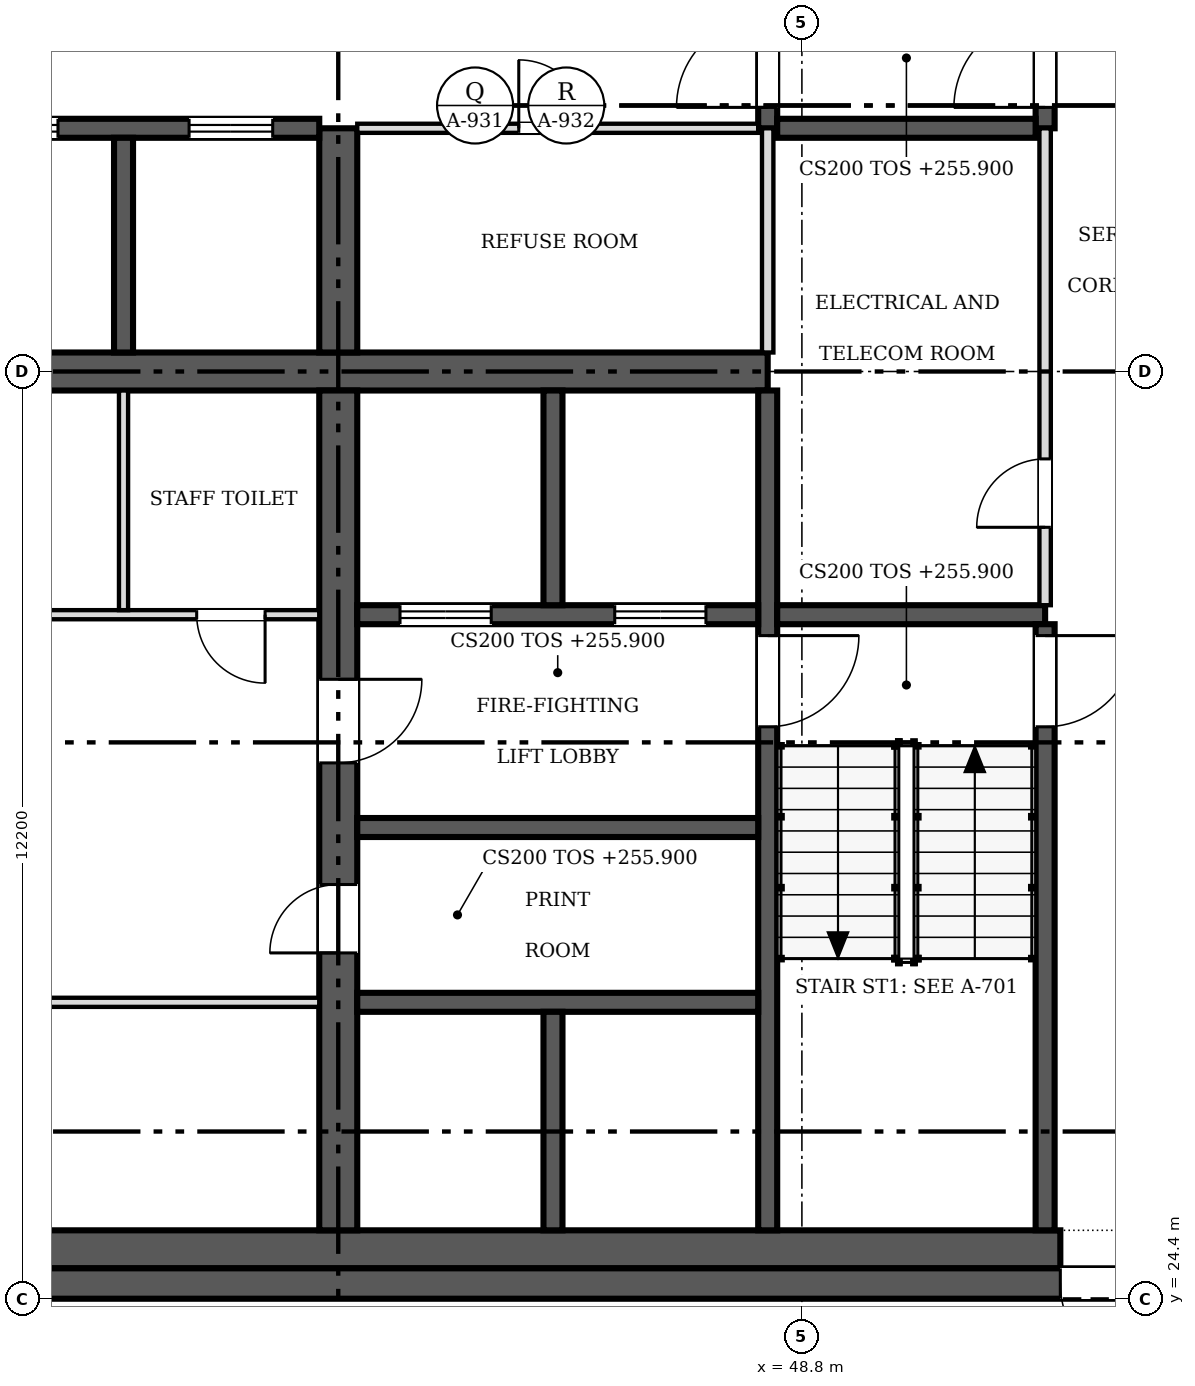
"""IFC4 building model, lengths in metres.
Left out: names, types, materials, properties, quantities, classifications, styles, units other than length and angle.
Written with IfcOpenShell. Run it as: python <this file> out.ifc"""

import sys

from ifc_helpers import new_model, si_unit, direction, frame, frame_2d, origin, place, context, subcontext, project, spatial, rectangle, extrude, source, transform, mapped, element, fill, save


model = new_model("IFC4")
c1 = context("Model", 3, precision=1e-05, world=origin(), true_north=direction((0.0, 1.0)))
c2 = subcontext(c1, "Body", "Model", "MODEL_VIEW")
j1 = project(units=[si_unit("LENGTHUNIT", "METRE"), si_unit("PLANEANGLEUNIT", "RADIAN")], contexts=[c1])
p1 = place(None, origin())
s1 = spatial("IfcSite", under=j1, at=p1, CompositionType="ELEMENT")
p2 = place(p1, origin())
s2 = spatial("IfcBuilding", under=s1, at=p2, CompositionType="ELEMENT")
p3 = place(p2, frame((0.0, 0.0, 255.9)))
s3 = spatial("IfcBuildingStorey", under=s2, at=p3, CompositionType="ELEMENT", Elevation=255.9)
p4 = place(p3, frame((54.9, 24.6, 0.0), z_axis=(0.0, 0.0, 1.0), x_axis=(-1.0, 0.0, 0.0)))
e1 = element("IfcWall", 1, at=p4, inside=s3, PredefinedType="SHEAR", context=c2, shape_type="SweptSolid", body=[
    extrude(rectangle(XDim=24.4, YDim=0.4, at=frame_2d((12.2, 0.0))), origin(), (0.0, 0.0, 1.0), 3.8),
])
m1 = source(origin(), c2, "Body", "SweptSolid", [
    extrude(rectangle(XDim=1.2, YDim=2.1, at=frame_2d((0.6, 1.05))), frame((0.0, 0.21, 0.0), z_axis=(0.0, -1.0, 0.0), x_axis=(1.0, 0.0, 0.0)), (0.0, 0.0, 1.0), 0.42),
])
p5 = place(p4, frame((1.5, 0.0, 0.0)))
e2 = element("IfcOpeningElement", 2, at=p5, cuts=e1, PredefinedType="OPENING", context=c2, shape_type="MappedRepresentation", body=[
    mapped(m1, transform((0.0, 0.0, 0.0), scale=1.0)),
])
p6 = place(p3, frame((30.9, 25.05, 0.0), z_axis=(0.0, 0.0, 1.0), x_axis=(1.0, 0.0, 0.0)))
e3 = element("IfcWall", 3, at=p6, inside=s3, PredefinedType="SOLIDWALL", context=c2, shape_type="SweptSolid", body=[
    extrude(rectangle(XDim=21.3, YDim=0.5, at=frame_2d((10.65, 0.0))), origin(), (0.0, 0.0, 1.0), 3.8),
])
p7 = place(p3, frame((31.4, 36.6, 0.0), z_axis=(0.0, 0.0, 1.0), x_axis=(1.0, 0.0, 0.0)))
e4 = element("IfcWall", 4, at=p7, inside=s3, PredefinedType="SHEAR", context=c2, shape_type="SweptSolid", body=[
    extrude(rectangle(XDim=16.95, YDim=0.5, at=frame_2d((8.475, 0.0))), origin(), (0.0, 0.0, 1.0), 3.8),
])
p8 = place(p3, frame((42.7, 36.35, 0.0), z_axis=(0.0, 0.0, 1.0), x_axis=(0.0, -1.0, 0.0)))
e5 = element("IfcWall", 5, at=p8, inside=s3, PredefinedType="SHEAR", context=c2, shape_type="SweptSolid", body=[
    extrude(rectangle(XDim=11.05, YDim=0.5, at=frame_2d((5.525, 0.0))), origin(), (0.0, 0.0, 1.0), 3.8),
])
m2 = source(origin(), c2, "Body", "SweptSolid", [
    extrude(rectangle(XDim=0.9, YDim=2.1, at=frame_2d((0.45, 1.05))), frame((0.0, 0.26, 0.0), z_axis=(0.0, -1.0, 0.0), x_axis=(1.0, 0.0, 0.0)), (0.0, 0.0, 1.0), 0.52),
])
p9 = place(p8, frame((6.5, 0.0, 0.0)))
e6 = element("IfcOpeningElement", 6, at=p9, cuts=e5, PredefinedType="OPENING", context=c2, shape_type="MappedRepresentation", body=[
    mapped(m2, transform((0.0, 0.0, 0.0), scale=1.0)),
])
m3 = source(origin(), c2, "Body", "SweptSolid", [
    extrude(rectangle(XDim=1.1, YDim=2.1, at=frame_2d((0.55, 1.05))), frame((0.0, 0.26, 0.0), z_axis=(0.0, -1.0, 0.0), x_axis=(1.0, 0.0, 0.0)), (0.0, 0.0, 1.0), 0.52),
])
p10 = place(p8, frame((3.8, 0.0, 0.0)))
e7 = element("IfcOpeningElement", 7, at=p10, cuts=e5, PredefinedType="OPENING", context=c2, shape_type="MappedRepresentation", body=[
    mapped(m3, transform((0.0, 0.0, 0.0), scale=1.0)),
])
p11 = place(p3, frame((42.7, 36.85, 0.0), z_axis=(0.0, 0.0, 1.0), x_axis=(0.0, 1.0, 0.0)))
e8 = element("IfcWall", 8, at=p11, inside=s3, PredefinedType="SHEAR", context=c2, shape_type="SweptSolid", body=[
    extrude(rectangle(XDim=2.95, YDim=0.5, at=frame_2d((1.475, 0.0))), origin(), (0.0, 0.0, 1.0), 3.8),
])
p12 = place(p3, frame((31.4, 39.8, 0.0), z_axis=(0.0, 0.0, 1.0), x_axis=(1.0, 0.0, 0.0)))
e9 = element("IfcWall", 9, at=p12, inside=s3, PredefinedType="SOLIDWALL", context=c2, shape_type="SweptSolid", body=[
    extrude(rectangle(XDim=11.05, YDim=0.25, at=frame_2d((5.525, 0.0))), origin(), (0.0, 0.0, 1.0), 3.8),
])
m4 = source(origin(), c2, "Body", "SweptSolid", [
    extrude(rectangle(XDim=1.1, YDim=2.1, at=frame_2d((0.55, 1.05))), frame((0.0, 0.135, 0.0), z_axis=(0.0, -1.0, 0.0), x_axis=(1.0, 0.0, 0.0)), (0.0, 0.0, 1.0), 0.27),
])
p13 = place(p12, frame((0.863, 0.0, 0.0)))
e10 = element("IfcOpeningElement", 10, at=p13, cuts=e9, PredefinedType="OPENING", context=c2, shape_type="MappedRepresentation", body=[
    mapped(m4, transform((0.0, 0.0, 0.0), scale=1.0)),
])
p14 = place(p12, frame((3.688, 0.0, 0.0)))
e11 = element("IfcOpeningElement", 11, at=p14, cuts=e9, PredefinedType="OPENING", context=c2, shape_type="MappedRepresentation", body=[
    mapped(m4, transform((0.0, 0.0, 0.0), scale=1.0)),
])
p15 = place(p12, frame((6.512, 0.0, 0.0)))
e12 = element("IfcOpeningElement", 12, at=p15, cuts=e9, PredefinedType="OPENING", context=c2, shape_type="MappedRepresentation", body=[
    mapped(m4, transform((0.0, 0.0, 0.0), scale=1.0)),
])
p16 = place(p12, frame((9.337, 0.0, 0.0)))
e13 = element("IfcOpeningElement", 13, at=p16, cuts=e9, PredefinedType="OPENING", context=c2, shape_type="MappedRepresentation", body=[
    mapped(m4, transform((0.0, 0.0, 0.0), scale=1.0)),
])
p17 = place(p3, frame((48.35, 36.35, 0.0), z_axis=(0.0, 0.0, 1.0), x_axis=(0.0, -1.0, 0.0)))
e14 = element("IfcWall", 14, at=p17, inside=s3, PredefinedType="SOLIDWALL", context=c2, shape_type="SweptSolid", body=[
    extrude(rectangle(XDim=11.05, YDim=0.25, at=frame_2d((5.525, 0.0))), origin(), (0.0, 0.0, 1.0), 3.8),
])
m5 = source(origin(), c2, "Body", "SweptSolid", [
    extrude(rectangle(XDim=1.2, YDim=2.1, at=frame_2d((0.6, 1.05))), frame((0.0, 0.135, 0.0), z_axis=(0.0, -1.0, 0.0), x_axis=(1.0, 0.0, 0.0)), (0.0, 0.0, 1.0), 0.27),
])
p18 = place(p17, frame((3.225, 0.0, 0.0)))
e15 = element("IfcOpeningElement", 15, at=p18, cuts=e14, PredefinedType="OPENING", context=c2, shape_type="MappedRepresentation", body=[
    mapped(m5, transform((0.0, 0.0, 0.0), scale=1.0)),
])
p19 = place(p3, frame((48.225, 33.4, 0.0), z_axis=(0.0, 0.0, 1.0), x_axis=(-1.0, 0.0, 0.0)))
e16 = element("IfcWall", 16, at=p19, inside=s3, PredefinedType="SOLIDWALL", context=c2, shape_type="SweptSolid", body=[
    extrude(rectangle(XDim=5.275, YDim=0.25, at=frame_2d((2.638, 0.0))), origin(), (0.0, 0.0, 1.0), 3.8),
])
p20 = place(p19, frame((3.512, 0.0, 0.0)))
e17 = element("IfcOpeningElement", 17, at=p20, cuts=e16, PredefinedType="OPENING", context=c2, shape_type="MappedRepresentation", body=[
    mapped(m5, transform((0.0, 0.0, 0.0), scale=1.0)),
])
p21 = place(p19, frame((0.688, 0.0, 0.0)))
e18 = element("IfcOpeningElement", 18, at=p21, cuts=e16, PredefinedType="OPENING", context=c2, shape_type="MappedRepresentation", body=[
    mapped(m5, transform((0.0, 0.0, 0.0), scale=1.0)),
])
p22 = place(p3, frame((48.475, 33.4, 0.0), z_axis=(0.0, 0.0, 1.0), x_axis=(1.0, 0.0, 0.0)))
e19 = element("IfcWall", 19, at=p22, inside=s3, PredefinedType="SOLIDWALL", context=c2, shape_type="SweptSolid", body=[
    extrude(rectangle(XDim=3.525, YDim=0.25, at=frame_2d((1.762, 0.0))), origin(), (0.0, 0.0, 1.0), 3.8),
])
p23 = place(p3, frame((48.35, 47.9, 0.0), z_axis=(0.0, 0.0, 1.0), x_axis=(0.0, -1.0, 0.0)))
e20 = element("IfcWall", 20, at=p23, inside=s3, PredefinedType="SOLIDWALL", context=c2, shape_type="SweptSolid", body=[
    extrude(rectangle(XDim=8.1, YDim=0.25, at=frame_2d((4.05, 0.0))), origin(), (0.0, 0.0, 1.0), 3.8),
])
p24 = place(p23, frame((6.625, 0.0, 0.0)))
e21 = element("IfcOpeningElement", 21, at=p24, cuts=e20, PredefinedType="OPENING", context=c2, shape_type="MappedRepresentation", body=[
    mapped(m5, transform((0.0, 0.0, 0.0), scale=1.0)),
])
p25 = place(p3, frame((52.0, 25.3, 0.0), z_axis=(0.0, 0.0, 1.0), x_axis=(0.0, 1.0, 0.0)))
e22 = element("IfcWall", 22, at=p25, inside=s3, PredefinedType="SOLIDWALL", context=c2, shape_type="SweptSolid", body=[
    extrude(rectangle(XDim=7.975, YDim=0.25, at=frame_2d((3.987, 0.0))), origin(), (0.0, 0.0, 1.0), 3.8),
])
p26 = place(p25, frame((6.625, 0.0, 0.0)))
e23 = element("IfcOpeningElement", 23, at=p26, cuts=e22, PredefinedType="OPENING", context=c2, shape_type="MappedRepresentation", body=[
    mapped(m5, transform((0.0, 0.0, 0.0), scale=1.0)),
])
p27 = place(p3, frame((52.0, 39.8, 0.0), z_axis=(0.0, 0.0, 1.0), x_axis=(0.0, 1.0, 0.0)))
e24 = element("IfcWall", 24, at=p27, inside=s3, PredefinedType="SOLIDWALL", context=c2, shape_type="SweptSolid", body=[
    extrude(rectangle(XDim=8.1, YDim=0.25, at=frame_2d((4.05, 0.0))), origin(), (0.0, 0.0, 1.0), 3.8),
])
p28 = place(p27, frame((0.275, 0.0, 0.0)))
e25 = element("IfcOpeningElement", 25, at=p28, cuts=e24, PredefinedType="OPENING", context=c2, shape_type="MappedRepresentation", body=[
    mapped(m5, transform((0.0, 0.0, 0.0), scale=1.0)),
])
for number, where, z_axis, x_axis in (
    (26, (42.95, 28.3, 0.0), (0.0, 0.0, 1.0), (1.0, 0.0, 0.0)),
    (27, (42.95, 30.6, 0.0), (0.0, 0.0, 1.0), (1.0, 0.0, 0.0)),
):
    element("IfcWall", number, at=place(p3, frame(where, z_axis=z_axis, x_axis=x_axis)), inside=s3, PredefinedType="SOLIDWALL", context=c2, shape_type="SweptSolid", body=[
        extrude(rectangle(XDim=5.275, YDim=0.25, at=frame_2d((2.638, 0.0))), origin(), (0.0, 0.0, 1.0), 3.8),
    ])
p29 = place(p3, frame((48.475, 39.8, 0.0), z_axis=(0.0, 0.0, 1.0), x_axis=(1.0, 0.0, 0.0)))
e28 = element("IfcWall", 28, at=p29, inside=s3, PredefinedType="SOLIDWALL", context=c2, shape_type="SweptSolid", body=[
    extrude(rectangle(XDim=3.4, YDim=0.25, at=frame_2d((1.7, 0.0))), origin(), (0.0, 0.0, 1.0), 3.8),
])
p30 = place(p3, frame((39.875, 36.85, 0.0), z_axis=(0.0, 0.0, 1.0), x_axis=(0.0, 1.0, 0.0)))
e29 = element("IfcWall", 29, at=p30, inside=s3, PredefinedType="SOLIDWALL", context=c2, shape_type="SweptSolid", body=[
    extrude(rectangle(XDim=2.825, YDim=0.25, at=frame_2d((1.413, 0.0))), origin(), (0.0, 0.0, 1.0), 3.8),
])
p31 = place(p3, frame((45.525, 33.525, 0.0), z_axis=(0.0, 0.0, 1.0), x_axis=(0.0, 1.0, 0.0)))
e30 = element("IfcWall", 30, at=p31, inside=s3, PredefinedType="SOLIDWALL", context=c2, shape_type="SweptSolid", body=[
    extrude(rectangle(XDim=2.825, YDim=0.25, at=frame_2d((1.413, 0.0))), origin(), (0.0, 0.0, 1.0), 3.8),
])
p32 = place(p3, frame((45.525, 25.3, 0.0), z_axis=(0.0, 0.0, 1.0), x_axis=(0.0, 1.0, 0.0)))
e31 = element("IfcWall", 31, at=p32, inside=s3, PredefinedType="SOLIDWALL", context=c2, shape_type="SweptSolid", body=[
    extrude(rectangle(XDim=2.875, YDim=0.25, at=frame_2d((1.438, 0.0))), origin(), (0.0, 0.0, 1.0), 3.8),
])
p33 = place(p3, frame((42.45, 28.3, 0.0), z_axis=(0.0, 0.0, 1.0), x_axis=(-1.0, 0.0, 0.0)))
e32 = element("IfcWall", 32, at=p33, inside=s3, PredefinedType="PARTITIONING", context=c2, shape_type="SweptSolid", body=[
    extrude(rectangle(XDim=11.05, YDim=0.12, at=frame_2d((5.525, 0.0))), origin(), (0.0, 0.0, 1.0), 3.55),
])
m6 = source(origin(), c2, "Body", "SweptSolid", [
    extrude(rectangle(XDim=0.9, YDim=2.1, at=frame_2d((0.45, 1.05))), frame((0.0, 0.07, 0.0), z_axis=(0.0, -1.0, 0.0), x_axis=(1.0, 0.0, 0.0)), (0.0, 0.0, 1.0), 0.14),
])
p34 = place(p33, frame((9.188, 0.0, 0.0)))
e33 = element("IfcOpeningElement", 33, at=p34, cuts=e32, PredefinedType="OPENING", context=c2, shape_type="MappedRepresentation", body=[
    mapped(m6, transform((0.0, 0.0, 0.0), scale=1.0)),
])
p35 = place(p33, frame((3.538, 0.0, 0.0)))
e34 = element("IfcOpeningElement", 34, at=p35, cuts=e32, PredefinedType="OPENING", context=c2, shape_type="MappedRepresentation", body=[
    mapped(m6, transform((0.0, 0.0, 0.0), scale=1.0)),
])
p36 = place(p3, frame((31.4, 33.4, 0.0), z_axis=(0.0, 0.0, 1.0), x_axis=(1.0, 0.0, 0.0)))
e35 = element("IfcWall", 35, at=p36, inside=s3, PredefinedType="PARTITIONING", context=c2, shape_type="SweptSolid", body=[
    extrude(rectangle(XDim=11.05, YDim=0.12, at=frame_2d((5.525, 0.0))), origin(), (0.0, 0.0, 1.0), 3.55),
])
p37 = place(p36, frame((3.788, 0.0, 0.0)))
e36 = element("IfcOpeningElement", 36, at=p37, cuts=e35, PredefinedType="OPENING", context=c2, shape_type="MappedRepresentation", body=[
    mapped(m6, transform((0.0, 0.0, 0.0), scale=1.0)),
])
p38 = place(p36, frame((9.438, 0.0, 0.0)))
e37 = element("IfcOpeningElement", 37, at=p38, cuts=e35, PredefinedType="OPENING", context=c2, shape_type="MappedRepresentation", body=[
    mapped(m6, transform((0.0, 0.0, 0.0), scale=1.0)),
])
p39 = place(p3, frame((52.0, 33.525, 0.0), z_axis=(0.0, 0.0, 1.0), x_axis=(0.0, 1.0, 0.0)))
e38 = element("IfcWall", 38, at=p39, inside=s3, PredefinedType="PARTITIONING", context=c2, shape_type="SweptSolid", body=[
    extrude(rectangle(XDim=6.275, YDim=0.15, at=frame_2d((3.138, 0.0))), origin(), (0.0, 0.0, 1.0), 3.55),
])
m7 = source(origin(), c2, "Body", "SweptSolid", [
    extrude(rectangle(XDim=0.9, YDim=2.1, at=frame_2d((0.45, 1.05))), frame((0.0, 0.085, 0.0), z_axis=(0.0, -1.0, 0.0), x_axis=(1.0, 0.0, 0.0)), (0.0, 0.0, 1.0), 0.17),
])
p40 = place(p39, frame((1.025, 0.0, 0.0)))
e39 = element("IfcOpeningElement", 39, at=p40, cuts=e38, PredefinedType="OPENING", context=c2, shape_type="MappedRepresentation", body=[
    mapped(m7, transform((0.0, 0.0, 0.0), scale=1.0)),
])
p41 = place(p3, frame((48.225, 39.8, 0.0), z_axis=(0.0, 0.0, 1.0), x_axis=(-1.0, 0.0, 0.0)))
e40 = element("IfcWall", 40, at=p41, inside=s3, PredefinedType="PARTITIONING", context=c2, shape_type="SweptSolid", body=[
    extrude(rectangle(XDim=5.275, YDim=0.12, at=frame_2d((2.638, 0.0))), origin(), (0.0, 0.0, 1.0), 3.55),
])
p42 = place(p41, frame((2.25, 0.0, 0.0)))
e41 = element("IfcOpeningElement", 41, at=p42, cuts=e40, PredefinedType="OPENING", context=c2, shape_type="MappedRepresentation", body=[
    mapped(m6, transform((0.0, 0.0, 0.0), scale=1.0)),
])
p43 = place(p3, frame((48.35, 36.85, 0.0), z_axis=(0.0, 0.0, 1.0), x_axis=(0.0, 1.0, 0.0)))
e42 = element("IfcWall", 42, at=p43, inside=s3, PredefinedType="PARTITIONING", context=c2, shape_type="SweptSolid", body=[
    extrude(rectangle(XDim=2.95, YDim=0.15, at=frame_2d((1.475, 0.0))), origin(), (0.0, 0.0, 1.0), 3.55),
])
p44 = place(p3, frame((39.875, 33.46, 0.0), z_axis=(0.0, 0.0, 1.0), x_axis=(0.0, 1.0, 0.0)))
e43 = element("IfcWall", 43, at=p44, inside=s3, PredefinedType="PARTITIONING", context=c2, shape_type="SweptSolid", body=[
    extrude(rectangle(XDim=2.89, YDim=0.12, at=frame_2d((1.445, 0.0))), origin(), (0.0, 0.0, 1.0), 3.55),
])
m8 = source(origin(), c2, "Body", "SweptSolid", [
    extrude(rectangle(XDim=1.2, YDim=2.1, at=frame_2d((0.6, 1.05))), frame((0.0, 0.025, 0.0), z_axis=(0.0, -1.0, 0.0), x_axis=(1.0, 0.0, 0.0)), (0.0, 0.0, 1.0), 0.05),
])
p45 = place(p5, origin())
e44 = element("IfcDoor", 44, at=p45, inside=s3, OperationType="SINGLE_SWING_LEFT", PredefinedType="DOOR", context=c2, shape_type="MappedRepresentation", body=[
    mapped(m8, transform((0.0, 0.0, 0.0), scale=1.0)),
])
fill(e2, e44)
m9 = source(origin(), c2, "Body", "SweptSolid", [
    extrude(rectangle(XDim=0.9, YDim=2.1, at=frame_2d((0.45, 1.05))), frame((0.0, 0.025, 0.0), z_axis=(0.0, -1.0, 0.0), x_axis=(1.0, 0.0, 0.0)), (0.0, 0.0, 1.0), 0.05),
])
p46 = place(p9, origin())
e45 = element("IfcDoor", 45, at=p46, inside=s3, OperationType="SINGLE_SWING_RIGHT", PredefinedType="DOOR", context=c2, shape_type="MappedRepresentation", body=[
    mapped(m9, transform((0.0, 0.0, 0.0), scale=1.0)),
])
fill(e6, e45)
m10 = source(origin(), c2, "Body", "SweptSolid", [
    extrude(rectangle(XDim=1.1, YDim=2.1, at=frame_2d((0.55, 1.05))), frame((0.0, 0.025, 0.0), z_axis=(0.0, -1.0, 0.0), x_axis=(1.0, 0.0, 0.0)), (0.0, 0.0, 1.0), 0.05),
])
p47 = place(p10, origin())
e46 = element("IfcDoor", 46, at=p47, inside=s3, OperationType="SINGLE_SWING_LEFT", PredefinedType="DOOR", context=c2, shape_type="MappedRepresentation", body=[
    mapped(m10, transform((0.0, 0.0, 0.0), scale=1.0)),
])
fill(e7, e46)
p48 = place(p15, origin())
e47 = element("IfcDoor", 47, at=p48, inside=s3, OperationType="DOUBLE_DOOR_SLIDING", PredefinedType="DOOR", context=c2, shape_type="MappedRepresentation", body=[
    mapped(m10, transform((0.0, 0.0, 0.0), scale=1.0)),
])
fill(e12, e47)
p49 = place(p16, origin())
e48 = element("IfcDoor", 48, at=p49, inside=s3, OperationType="DOUBLE_DOOR_SLIDING", PredefinedType="DOOR", context=c2, shape_type="MappedRepresentation", body=[
    mapped(m10, transform((0.0, 0.0, 0.0), scale=1.0)),
])
fill(e13, e48)
p50 = place(p18, origin())
e49 = element("IfcDoor", 49, at=p50, inside=s3, OperationType="SINGLE_SWING_LEFT", PredefinedType="DOOR", context=c2, shape_type="MappedRepresentation", body=[
    mapped(m8, transform((0.0, 0.0, 0.0), scale=1.0)),
])
fill(e15, e49)
p51 = place(p20, origin())
e50 = element("IfcDoor", 50, at=p51, inside=s3, OperationType="DOUBLE_DOOR_SLIDING", PredefinedType="DOOR", context=c2, shape_type="MappedRepresentation", body=[
    mapped(m8, transform((0.0, 0.0, 0.0), scale=1.0)),
])
fill(e17, e50)
p52 = place(p21, origin())
e51 = element("IfcDoor", 51, at=p52, inside=s3, OperationType="DOUBLE_DOOR_SLIDING", PredefinedType="DOOR", context=c2, shape_type="MappedRepresentation", body=[
    mapped(m8, transform((0.0, 0.0, 0.0), scale=1.0)),
])
fill(e18, e51)
p53 = place(p24, origin())
e52 = element("IfcDoor", 52, at=p53, inside=s3, OperationType="SINGLE_SWING_RIGHT", PredefinedType="DOOR", context=c2, shape_type="MappedRepresentation", body=[
    mapped(m8, transform((0.0, 0.0, 0.0), scale=1.0)),
])
fill(e21, e52)
p54 = place(p26, origin())
e53 = element("IfcDoor", 53, at=p54, inside=s3, OperationType="SINGLE_SWING_RIGHT", PredefinedType="DOOR", context=c2, shape_type="MappedRepresentation", body=[
    mapped(m8, transform((0.0, 0.0, 0.0), scale=1.0)),
])
fill(e23, e53)
p55 = place(p28, origin())
e54 = element("IfcDoor", 54, at=p55, inside=s3, OperationType="SINGLE_SWING_LEFT", PredefinedType="DOOR", context=c2, shape_type="MappedRepresentation", body=[
    mapped(m8, transform((0.0, 0.0, 0.0), scale=1.0)),
])
fill(e25, e54)
p56 = place(p38, origin())
e55 = element("IfcDoor", 55, at=p56, inside=s3, OperationType="SINGLE_SWING_RIGHT", PredefinedType="DOOR", context=c2, shape_type="MappedRepresentation", body=[
    mapped(m9, transform((0.0, 0.0, 0.0), scale=1.0)),
])
fill(e37, e55)
p57 = place(p40, origin())
e56 = element("IfcDoor", 56, at=p57, inside=s3, OperationType="SINGLE_SWING_LEFT", PredefinedType="DOOR", context=c2, shape_type="MappedRepresentation", body=[
    mapped(m9, transform((0.0, 0.0, 0.0), scale=1.0)),
])
fill(e39, e56)
p58 = place(p42, origin())
e57 = element("IfcDoor", 57, at=p58, inside=s3, OperationType="SINGLE_SWING_RIGHT", PredefinedType="DOOR", context=c2, shape_type="MappedRepresentation", body=[
    mapped(m9, transform((0.0, 0.0, 0.0), scale=1.0)),
])
fill(e41, e57)
save(model, sys.argv[1])
